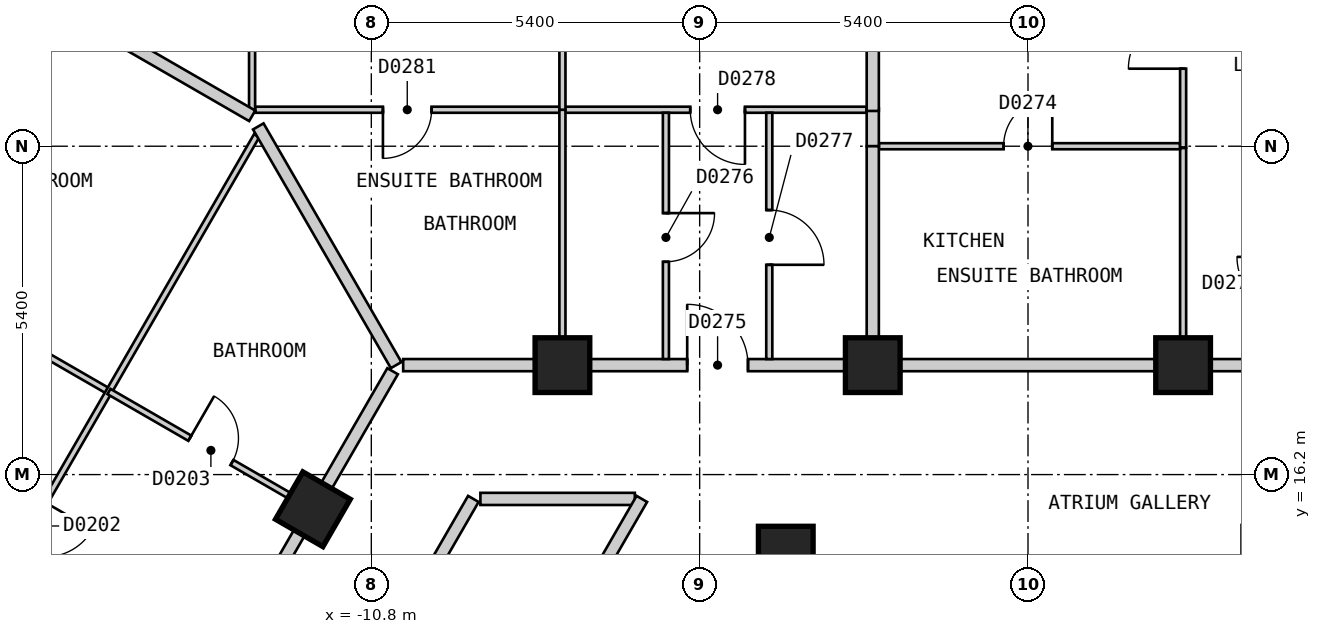
"""IFC4 building model, lengths in metres.
Left out: names, types, materials, properties, quantities, classifications, styles, units other than length and angle.
Written with IfcOpenShell. Run it as: python <this file> out.ifc"""

import sys

from ifc_helpers import new_model, si_unit, direction, frame, frame_2d, origin, origin_2d, place, context, subcontext, project, spatial, rectangle, extrude, element, fill, save


model = new_model("IFC4")
c1 = context("Model", 3, precision=1e-05, world=origin(), true_north=direction((0.0, 1.0)))
c2 = subcontext(c1, "Body", "Model", "MODEL_VIEW")
j1 = project(units=[si_unit("LENGTHUNIT", "METRE"), si_unit("PLANEANGLEUNIT", "RADIAN")], contexts=[c1])
p1 = place(None, origin())
s1 = spatial("IfcSite", under=j1, at=p1, CompositionType="ELEMENT")
p2 = place(p1, origin())
s2 = spatial("IfcBuilding", under=s1, at=p2, CompositionType="ELEMENT")
p3 = place(p2, frame((0.0, 0.0, 47.4)))
s3 = spatial("IfcBuildingStorey", under=s2, at=p3, CompositionType="ELEMENT", Elevation=47.4)
for number, where, z_axis, x_axis in (
    (1, (2.551, 18.0, 0.0), (0.0, 0.0, 1.0), (-1.0, 0.0, 0.0)),
    (2, (-2.553, 18.0, 0.0), (0.0, 0.0, 1.0), (-1.0, 0.0, 0.0)),
    (3, (-3.984, 14.9, 0.0), (0.0, 0.0, 1.0), (1.0, 0.0, 0.0)),
    (4, (-7.657, 18.0, 0.0), (0.0, 0.0, 1.0), (-1.0, 0.0, 0.0)),
    (5, (-11.761, 15.63, 0.0), (0.0, 0.0, 1.0), (-0.5, -0.866, 0.0)),
):
    element("IfcColumn", number, at=place(p3, frame(where, z_axis=z_axis, x_axis=x_axis)), inside=s3, PredefinedType="COLUMN", context=c2, shape_type="SweptSolid", body=[
        extrude(rectangle(XDim=0.9, YDim=0.9, at=origin_2d()), origin(), (0.0, 0.0, 1.0), 3.0),
    ])
p4 = place(p3, frame((-9.006, 15.8, 0.0), z_axis=(0.0, 0.0, 1.0), x_axis=(1.0, 0.0, 0.0)))
e6 = element("IfcWall", 6, at=p4, inside=s3, PredefinedType="PARTITIONING", context=c2, shape_type="SweptSolid", body=[
    extrude(rectangle(XDim=2.54, YDim=0.2, at=frame_2d((1.27, 0.0))), origin(), (0.0, 0.0, 1.0), 2.7),
])
p5 = place(p3, frame((-10.276, 18.0, 0.0), z_axis=(0.0, 0.0, 1.0), x_axis=(1.0, 0.0, 0.0)))
e7 = element("IfcWall", 7, at=p5, inside=s3, PredefinedType="PARTITIONING", context=c2, shape_type="SweptSolid", body=[
    extrude(rectangle(XDim=20.558, YDim=0.2, at=frame_2d((10.279, 0.0))), origin(), (0.0, 0.0, 1.0), 2.7),
])
p6 = place(p5, frame((19.265, 0.0, 0.0)))
e8 = element("IfcOpeningElement", 8, at=p6, cuts=e7, PredefinedType="OPENING", context=c2, shape_type="SweptSolid", body=[
    extrude(rectangle(XDim=1.0, YDim=2.1, at=frame_2d((0.5, 1.05))), frame((0.0, 0.11, 0.0), z_axis=(0.0, -1.0, 0.0), x_axis=(1.0, 0.0, 0.0)), (0.0, 0.0, 1.0), 0.22),
])
p7 = place(p5, frame((14.879, 0.0, 0.0)))
e9 = element("IfcOpeningElement", 9, at=p7, cuts=e7, PredefinedType="OPENING", context=c2, shape_type="SweptSolid", body=[
    extrude(rectangle(XDim=1.0, YDim=2.1, at=frame_2d((0.5, 1.05))), frame((0.0, 0.11, 0.0), z_axis=(0.0, -1.0, 0.0), x_axis=(1.0, 0.0, 0.0)), (0.0, 0.0, 1.0), 0.22),
])
p8 = place(p5, frame((4.671, 0.0, 0.0)))
e10 = element("IfcOpeningElement", 10, at=p8, cuts=e7, PredefinedType="OPENING", context=c2, shape_type="SweptSolid", body=[
    extrude(rectangle(XDim=1.0, YDim=2.1, at=frame_2d((0.5, 1.05))), frame((0.0, 0.11, 0.0), z_axis=(0.0, -1.0, 0.0), x_axis=(1.0, 0.0, 0.0)), (0.0, 0.0, 1.0), 0.22),
])
p9 = place(p3, frame((-10.854, 8.0, 0.0), z_axis=(0.0, 0.0, 1.0), x_axis=(0.499964141897, 0.86604610548, 0.0)))
e11 = element("IfcWall", 11, at=p9, inside=s3, PredefinedType="PARTITIONING", context=c2, shape_type="SweptSolid", body=[
    extrude(rectangle(XDim=9.007, YDim=0.2, at=frame_2d((4.503, 0.0))), origin(), (0.0, 0.0, 1.0), 2.7),
])
p10 = place(p3, frame((-18.244, -0.001, 0.0), z_axis=(0.0, 0.0, 1.0), x_axis=(0.499962999376, 0.866046765051, 0.0)))
e12 = element("IfcWall", 12, at=p10, inside=s3, PredefinedType="PARTITIONING", context=c2, shape_type="SweptSolid", body=[
    extrude(rectangle(XDim=18.245, YDim=0.2, at=frame_2d((9.123, 0.0))), origin(), (0.0, 0.0, 1.0), 2.7),
])
p11 = place(p10, frame((8.672, 0.0, 0.0)))
e13 = element("IfcOpeningElement", 13, at=p11, cuts=e12, PredefinedType="OPENING", context=c2, shape_type="SweptSolid", body=[
    extrude(rectangle(XDim=0.9, YDim=2.1, at=frame_2d((0.45, 1.05))), frame((0.0, 0.11, 0.0), z_axis=(0.0, -1.0, 0.0), x_axis=(1.0, 0.0, 0.0)), (0.0, 0.0, 1.0), 0.22),
])
p12 = place(p3, frame((-20.727, 0.099, 0.0), z_axis=(0.0, 0.0, 1.0), x_axis=(0.499993204491, 0.866029327138, 0.0)))
e14 = element("IfcWall", 14, at=p12, inside=s3, PredefinedType="PARTITIONING", context=c2, shape_type="SweptSolid", body=[
    extrude(rectangle(XDim=20.554, YDim=0.2, at=frame_2d((10.277, 0.0))), origin(), (0.0, 0.0, 1.0), 2.7),
])
p13 = place(p12, frame((14.88, 0.0, 0.0)))
e15 = element("IfcOpeningElement", 15, at=p13, cuts=e14, PredefinedType="OPENING", context=c2, shape_type="SweptSolid", body=[
    extrude(rectangle(XDim=1.0, YDim=2.1, at=frame_2d((0.5, 1.05))), frame((0.0, 0.11, 0.0), z_axis=(0.0, -1.0, 0.0), x_axis=(1.0, 0.0, 0.0)), (0.0, 0.0, 1.0), 0.22),
])
p14 = place(p12, frame((4.673, 0.0, 0.0)))
e16 = element("IfcOpeningElement", 16, at=p14, cuts=e14, PredefinedType="OPENING", context=c2, shape_type="SweptSolid", body=[
    extrude(rectangle(XDim=1.0, YDim=2.1, at=frame_2d((0.5, 1.05))), frame((0.0, 0.11, 0.0), z_axis=(0.0, -1.0, 0.0), x_axis=(1.0, 0.0, 0.0)), (0.0, 0.0, 1.0), 0.22),
])
p15 = place(p12, frame((0.838, 0.0, 0.0)))
e17 = element("IfcOpeningElement", 17, at=p15, cuts=e14, PredefinedType="OPENING", context=c2, shape_type="SweptSolid", body=[
    extrude(rectangle(XDim=0.8, YDim=2.1, at=frame_2d((0.4, 1.05))), frame((0.0, 0.11, 0.0), z_axis=(0.0, -1.0, 0.0), x_axis=(1.0, 0.0, 0.0)), (0.0, 0.0, 1.0), 0.22),
])
p16 = place(p3, frame((2.551, 21.57, 0.0), z_axis=(0.0, 0.0, 1.0), x_axis=(0.0, -1.0, 0.0)))
e18 = element("IfcWall", 18, at=p16, inside=s3, PredefinedType="PARTITIONING", context=c2, shape_type="SweptSolid", body=[
    extrude(rectangle(XDim=3.47, YDim=0.1, at=frame_2d((1.735, 0.0))), origin(), (0.0, 0.0, 1.0), 2.7),
])
p17 = place(p3, frame((-20.508, 20.679, 0.0), z_axis=(0.0, 0.0, 1.0), x_axis=(0.86607068519, -0.499921562103, 0.0)))
e19 = element("IfcWall", 19, at=p17, inside=s3, PredefinedType="PARTITIONING", context=c2, shape_type="SweptSolid", body=[
    extrude(rectangle(XDim=6.227, YDim=0.1, at=frame_2d((3.114, 0.0))), origin(), (0.0, 0.0, 1.0), 2.7),
])
p18 = place(p17, frame((2.663, 0.0, 0.0)))
e20 = element("IfcOpeningElement", 20, at=p18, cuts=e19, PredefinedType="OPENING", context=c2, shape_type="SweptSolid", body=[
    extrude(rectangle(XDim=0.9, YDim=2.1, at=frame_2d((0.45, 1.05))), frame((0.0, 0.06, 0.0), z_axis=(0.0, -1.0, 0.0), x_axis=(1.0, 0.0, 0.0)), (0.0, 0.0, 1.0), 0.12),
])
p19 = place(p3, frame((-2.453, 21.6, 0.0), z_axis=(0.0, 0.0, 1.0), x_axis=(1.0, 0.0, 0.0)))
e21 = element("IfcWall", 21, at=p19, inside=s3, PredefinedType="PARTITIONING", context=c2, shape_type="SweptSolid", body=[
    extrude(rectangle(XDim=4.954, YDim=0.1, at=frame_2d((2.477, 0.0))), origin(), (0.0, 0.0, 1.0), 2.7),
])
p20 = place(p19, frame((2.052, 0.0, 0.0)))
e22 = element("IfcOpeningElement", 22, at=p20, cuts=e21, PredefinedType="OPENING", context=c2, shape_type="SweptSolid", body=[
    extrude(rectangle(XDim=0.8, YDim=2.1, at=frame_2d((0.4, 1.05))), frame((0.0, 0.06, 0.0), z_axis=(0.0, -1.0, 0.0), x_axis=(1.0, 0.0, 0.0)), (0.0, 0.0, 1.0), 0.12),
])
p21 = place(p3, frame((-12.711, 22.2, 0.0), z_axis=(0.0, 0.0, 1.0), x_axis=(1.0, 0.0, 0.0)))
e23 = element("IfcWall", 23, at=p21, inside=s3, PredefinedType="PARTITIONING", context=c2, shape_type="SweptSolid", body=[
    extrude(rectangle(XDim=10.058, YDim=0.1, at=frame_2d((5.029, 0.0))), origin(), (0.0, 0.0, 1.0), 2.7),
])
p22 = place(p21, frame((7.156, 0.0, 0.0)))
e24 = element("IfcOpeningElement", 24, at=p22, cuts=e23, PredefinedType="OPENING", context=c2, shape_type="SweptSolid", body=[
    extrude(rectangle(XDim=0.9, YDim=2.1, at=frame_2d((0.45, 1.05))), frame((0.0, 0.06, 0.0), z_axis=(0.0, -1.0, 0.0), x_axis=(1.0, 0.0, 0.0)), (0.0, 0.0, 1.0), 0.12),
])
p23 = place(p21, frame((2.102, 0.0, 0.0)))
e25 = element("IfcOpeningElement", 25, at=p23, cuts=e23, PredefinedType="OPENING", context=c2, shape_type="SweptSolid", body=[
    extrude(rectangle(XDim=0.8, YDim=2.1, at=frame_2d((0.4, 1.05))), frame((0.0, 0.06, 0.0), z_axis=(0.0, -1.0, 0.0), x_axis=(1.0, 0.0, 0.0)), (0.0, 0.0, 1.0), 0.12),
])
p24 = place(p3, frame((-20.169, 8.812, 0.0), z_axis=(0.0, 0.0, 1.0), x_axis=(0.499995459772, 0.86602802507, 0.0)))
e26 = element("IfcWall", 26, at=p24, inside=s3, PredefinedType="PARTITIONING", context=c2, shape_type="SweptSolid", body=[
    extrude(rectangle(XDim=14.966, YDim=0.1, at=frame_2d((7.483, 0.0))), origin(), (0.0, 0.0, 1.0), 2.7),
])
p25 = place(p24, frame((7.105, 0.0, 0.0)))
e27 = element("IfcOpeningElement", 27, at=p25, cuts=e26, PredefinedType="OPENING", context=c2, shape_type="SweptSolid", body=[
    extrude(rectangle(XDim=0.9, YDim=2.1, at=frame_2d((0.45, 1.05))), frame((0.0, 0.06, 0.0), z_axis=(0.0, -1.0, 0.0), x_axis=(1.0, 0.0, 0.0)), (0.0, 0.0, 1.0), 0.12),
])
p26 = place(p3, frame((2.551, 21.58, 0.0), z_axis=(0.0, 0.0, 1.0), x_axis=(0.0, 1.0, 0.0)))
e28 = element("IfcWall", 28, at=p26, inside=s3, PredefinedType="PARTITIONING", context=c2, shape_type="SweptSolid", body=[
    extrude(rectangle(XDim=3.49, YDim=0.1, at=frame_2d((1.745, 0.0))), origin(), (0.0, 0.0, 1.0), 2.7),
])
p27 = place(p26, frame((1.295, 0.0, 0.0)))
e29 = element("IfcOpeningElement", 29, at=p27, cuts=e28, PredefinedType="OPENING", context=c2, shape_type="SweptSolid", body=[
    extrude(rectangle(XDim=0.9, YDim=2.1, at=frame_2d((0.45, 1.05))), frame((0.0, 0.06, 0.0), z_axis=(0.0, -1.0, 0.0), x_axis=(1.0, 0.0, 0.0)), (0.0, 0.0, 1.0), 0.12),
])
p28 = place(p3, frame((-4.255, 18.1, 0.0), z_axis=(0.0, 0.0, 1.0), x_axis=(0.0, 1.0, 0.0)))
e30 = element("IfcWall", 30, at=p28, inside=s3, PredefinedType="PARTITIONING", context=c2, shape_type="SweptSolid", body=[
    extrude(rectangle(XDim=4.05, YDim=0.1, at=frame_2d((2.025, 0.0))), origin(), (0.0, 0.0, 1.0), 2.7),
])
p29 = place(p28, frame((1.55, 0.0, 0.0)))
e31 = element("IfcOpeningElement", 31, at=p29, cuts=e30, PredefinedType="OPENING", context=c2, shape_type="SweptSolid", body=[
    extrude(rectangle(XDim=0.9, YDim=2.1, at=frame_2d((0.45, 1.05))), frame((0.0, 0.06, 0.0), z_axis=(0.0, -1.0, 0.0), x_axis=(1.0, 0.0, 0.0)), (0.0, 0.0, 1.0), 0.12),
])
p30 = place(p3, frame((-5.955, 18.1, 0.0), z_axis=(0.0, 0.0, 1.0), x_axis=(0.0, 1.0, 0.0)))
e32 = element("IfcWall", 32, at=p30, inside=s3, PredefinedType="PARTITIONING", context=c2, shape_type="SweptSolid", body=[
    extrude(rectangle(XDim=4.05, YDim=0.1, at=frame_2d((2.025, 0.0))), origin(), (0.0, 0.0, 1.0), 2.7),
])
p31 = place(p30, frame((1.6, 0.0, 0.0)))
e33 = element("IfcOpeningElement", 33, at=p31, cuts=e32, PredefinedType="OPENING", context=c2, shape_type="SweptSolid", body=[
    extrude(rectangle(XDim=0.8, YDim=2.1, at=frame_2d((0.4, 1.05))), frame((0.0, 0.06, 0.0), z_axis=(0.0, -1.0, 0.0), x_axis=(1.0, 0.0, 0.0)), (0.0, 0.0, 1.0), 0.12),
])
p32 = place(p3, frame((-7.657, 18.1, 0.0), z_axis=(0.0, 0.0, 1.0), x_axis=(0.0, 1.0, 0.0)))
e34 = element("IfcWall", 34, at=p32, inside=s3, PredefinedType="PARTITIONING", context=c2, shape_type="SweptSolid", body=[
    extrude(rectangle(XDim=4.1, YDim=0.1, at=frame_2d((2.05, 0.0))), origin(), (0.0, 0.0, 1.0), 2.7),
])
p33 = place(p3, frame((-12.761, 22.2, 0.0), z_axis=(0.0, 0.0, 1.0), x_axis=(0.0, 1.0, 0.0)))
e35 = element("IfcWall", 35, at=p33, inside=s3, PredefinedType="PARTITIONING", context=c2, shape_type="SweptSolid", body=[
    extrude(rectangle(XDim=5.9, YDim=0.1, at=frame_2d((2.95, 0.0))), origin(), (0.0, 0.0, 1.0), 2.7),
])
p34 = place(p33, frame((2.5, 0.0, 0.0)))
e36 = element("IfcOpeningElement", 36, at=p34, cuts=e35, PredefinedType="OPENING", context=c2, shape_type="SweptSolid", body=[
    extrude(rectangle(XDim=0.9, YDim=2.1, at=frame_2d((0.45, 1.05))), frame((0.0, 0.06, 0.0), z_axis=(0.0, -1.0, 0.0), x_axis=(1.0, 0.0, 0.0)), (0.0, 0.0, 1.0), 0.12),
])
p35 = place(p3, frame((-12.659, 21.926, 0.0), z_axis=(0.0, 0.0, 1.0), x_axis=(0.500025458316, -0.86601070492, 0.0)))
e37 = element("IfcWall", 37, at=p35, inside=s3, PredefinedType="PARTITIONING", context=c2, shape_type="SweptSolid", body=[
    extrude(rectangle(XDim=4.533, YDim=0.2, at=frame_2d((2.267, 0.0))), origin(), (0.0, 0.0, 1.0), 2.7),
])
p36 = place(p3, frame((-2.553, 22.22, 0.0), z_axis=(0.0, 0.0, 1.0), x_axis=(0.0, -1.0, 0.0)))
e38 = element("IfcWall", 38, at=p36, inside=s3, PredefinedType="PARTITIONING", context=c2, shape_type="SweptSolid", body=[
    extrude(rectangle(XDim=0.62, YDim=0.2, at=frame_2d((0.31, 0.0))), origin(), (0.0, 0.0, 1.0), 2.7),
])
p37 = place(p3, frame((-17.955, 25.099, 0.0), z_axis=(0.0, 0.0, 1.0), x_axis=(0.86609140076, -0.499885672459, 0.0)))
e39 = element("IfcWall", 39, at=p37, inside=s3, PredefinedType="PARTITIONING", context=c2, shape_type="SweptSolid", body=[
    extrude(rectangle(XDim=6.0, YDim=0.2, at=frame_2d((3.0, 0.0))), origin(), (0.0, 0.0, 1.0), 2.7),
])
p38 = place(p3, frame((-2.553, 18.1, 0.0), z_axis=(0.0, 0.0, 1.0), x_axis=(0.0, 1.0, 0.0)))
e40 = element("IfcWall", 40, at=p38, inside=s3, PredefinedType="PARTITIONING", context=c2, shape_type="SweptSolid", body=[
    extrude(rectangle(XDim=3.5, YDim=0.2, at=frame_2d((1.75, 0.0))), origin(), (0.0, 0.0, 1.0), 2.7),
])
p39 = place(p3, frame((-2.553, 22.18, 0.0), z_axis=(0.0, 0.0, 1.0), x_axis=(0.0, 1.0, 0.0)))
e41 = element("IfcWall", 41, at=p39, inside=s3, PredefinedType="PARTITIONING", context=c2, shape_type="SweptSolid", body=[
    extrude(rectangle(XDim=5.92, YDim=0.2, at=frame_2d((2.96, 0.0))), origin(), (0.0, 0.0, 1.0), 2.7),
])
p40 = place(p3, frame((-15.115, 17.566, 0.0), z_axis=(0.0, 0.0, 1.0), x_axis=(0.866008894869, -0.50002859319, 0.0)))
e42 = element("IfcWall", 42, at=p40, inside=s3, PredefinedType="PARTITIONING", context=c2, shape_type="SweptSolid", body=[
    extrude(rectangle(XDim=3.774, YDim=0.1, at=frame_2d((1.887, 0.0))), origin(), (0.0, 0.0, 1.0), 2.7),
])
p41 = place(p40, frame((1.536, 0.0, 0.0)))
e43 = element("IfcOpeningElement", 43, at=p41, cuts=e42, PredefinedType="OPENING", context=c2, shape_type="SweptSolid", body=[
    extrude(rectangle(XDim=0.8, YDim=2.1, at=frame_2d((0.4, 1.05))), frame((0.0, 0.06, 0.0), z_axis=(0.0, -1.0, 0.0), x_axis=(1.0, 0.0, 0.0)), (0.0, 0.0, 1.0), 0.12),
])
p42 = place(p3, frame((-7.657, 22.2, 0.0), z_axis=(0.0, 0.0, 1.0), x_axis=(0.0, 1.0, 0.0)))
e44 = element("IfcWall", 44, at=p42, inside=s3, PredefinedType="PARTITIONING", context=c2, shape_type="SweptSolid", body=[
    extrude(rectangle(XDim=5.9, YDim=0.1, at=frame_2d((2.95, 0.0))), origin(), (0.0, 0.0, 1.0), 2.7),
])
p43 = place(p42, frame((2.5, 0.0, 0.0)))
e45 = element("IfcOpeningElement", 45, at=p43, cuts=e44, PredefinedType="OPENING", context=c2, shape_type="SweptSolid", body=[
    extrude(rectangle(XDim=0.9, YDim=2.1, at=frame_2d((0.45, 1.05))), frame((0.0, 0.06, 0.0), z_axis=(0.0, -1.0, 0.0), x_axis=(1.0, 0.0, 0.0)), (0.0, 0.0, 1.0), 0.12),
])
p44 = place(p41, origin())
e46 = element("IfcDoor", 46, at=p44, inside=s3, OperationType="SINGLE_SWING_LEFT", PredefinedType="DOOR", context=c2, shape_type="SweptSolid", body=[
    extrude(rectangle(XDim=0.8, YDim=2.1, at=frame_2d((0.4, 1.05))), frame((0.0, 0.025, 0.0), z_axis=(0.0, -1.0, 0.0), x_axis=(1.0, 0.0, 0.0)), (0.0, 0.0, 1.0), 0.05),
])
fill(e43, e46)
p45 = place(p27, origin())
e47 = element("IfcDoor", 47, at=p45, inside=s3, OperationType="SINGLE_SWING_LEFT", PredefinedType="DOOR", context=c2, shape_type="SweptSolid", body=[
    extrude(rectangle(XDim=0.9, YDim=2.1, at=frame_2d((0.45, 1.05))), frame((0.0, 0.025, 0.0), z_axis=(0.0, -1.0, 0.0), x_axis=(1.0, 0.0, 0.0)), (0.0, 0.0, 1.0), 0.05),
])
fill(e29, e47)
p46 = place(p20, origin())
e48 = element("IfcDoor", 48, at=p46, inside=s3, OperationType="SINGLE_SWING_RIGHT", PredefinedType="DOOR", context=c2, shape_type="SweptSolid", body=[
    extrude(rectangle(XDim=0.8, YDim=2.1, at=frame_2d((0.4, 1.05))), frame((0.0, 0.025, 0.0), z_axis=(0.0, -1.0, 0.0), x_axis=(1.0, 0.0, 0.0)), (0.0, 0.0, 1.0), 0.05),
])
fill(e22, e48)
p47 = place(p8, origin())
e49 = element("IfcDoor", 49, at=p47, inside=s3, OperationType="SINGLE_SWING_LEFT", PredefinedType="DOOR", context=c2, shape_type="SweptSolid", body=[
    extrude(rectangle(XDim=1.0, YDim=2.1, at=frame_2d((0.5, 1.05))), frame((0.0, 0.025, 0.0), z_axis=(0.0, -1.0, 0.0), x_axis=(1.0, 0.0, 0.0)), (0.0, 0.0, 1.0), 0.05),
])
fill(e10, e49)
p48 = place(p31, origin())
e50 = element("IfcDoor", 50, at=p48, inside=s3, OperationType="SINGLE_SWING_RIGHT", PredefinedType="DOOR", context=c2, shape_type="SweptSolid", body=[
    extrude(rectangle(XDim=0.8, YDim=2.1, at=frame_2d((0.4, 1.05))), frame((0.0, 0.025, 0.0), z_axis=(0.0, -1.0, 0.0), x_axis=(1.0, 0.0, 0.0)), (0.0, 0.0, 1.0), 0.05),
])
fill(e33, e50)
p49 = place(p29, origin())
e51 = element("IfcDoor", 51, at=p49, inside=s3, OperationType="SINGLE_SWING_LEFT", PredefinedType="DOOR", context=c2, shape_type="SweptSolid", body=[
    extrude(rectangle(XDim=0.9, YDim=2.1, at=frame_2d((0.45, 1.05))), frame((0.0, 0.025, 0.0), z_axis=(0.0, -1.0, 0.0), x_axis=(1.0, 0.0, 0.0)), (0.0, 0.0, 1.0), 0.05),
])
fill(e31, e51)
p50 = place(p22, origin())
e52 = element("IfcDoor", 52, at=p50, inside=s3, OperationType="SINGLE_SWING_RIGHT", PredefinedType="DOOR", context=c2, shape_type="SweptSolid", body=[
    extrude(rectangle(XDim=0.9, YDim=2.1, at=frame_2d((0.45, 1.05))), frame((0.0, 0.025, 0.0), z_axis=(0.0, -1.0, 0.0), x_axis=(1.0, 0.0, 0.0)), (0.0, 0.0, 1.0), 0.05),
])
fill(e24, e52)
p51 = place(p23, origin())
e53 = element("IfcDoor", 53, at=p51, inside=s3, OperationType="SINGLE_SWING_LEFT", PredefinedType="DOOR", context=c2, shape_type="SweptSolid", body=[
    extrude(rectangle(XDim=0.8, YDim=2.1, at=frame_2d((0.4, 1.05))), frame((0.0, 0.025, 0.0), z_axis=(0.0, -1.0, 0.0), x_axis=(1.0, 0.0, 0.0)), (0.0, 0.0, 1.0), 0.05),
])
fill(e25, e53)
save(model, sys.argv[1])
